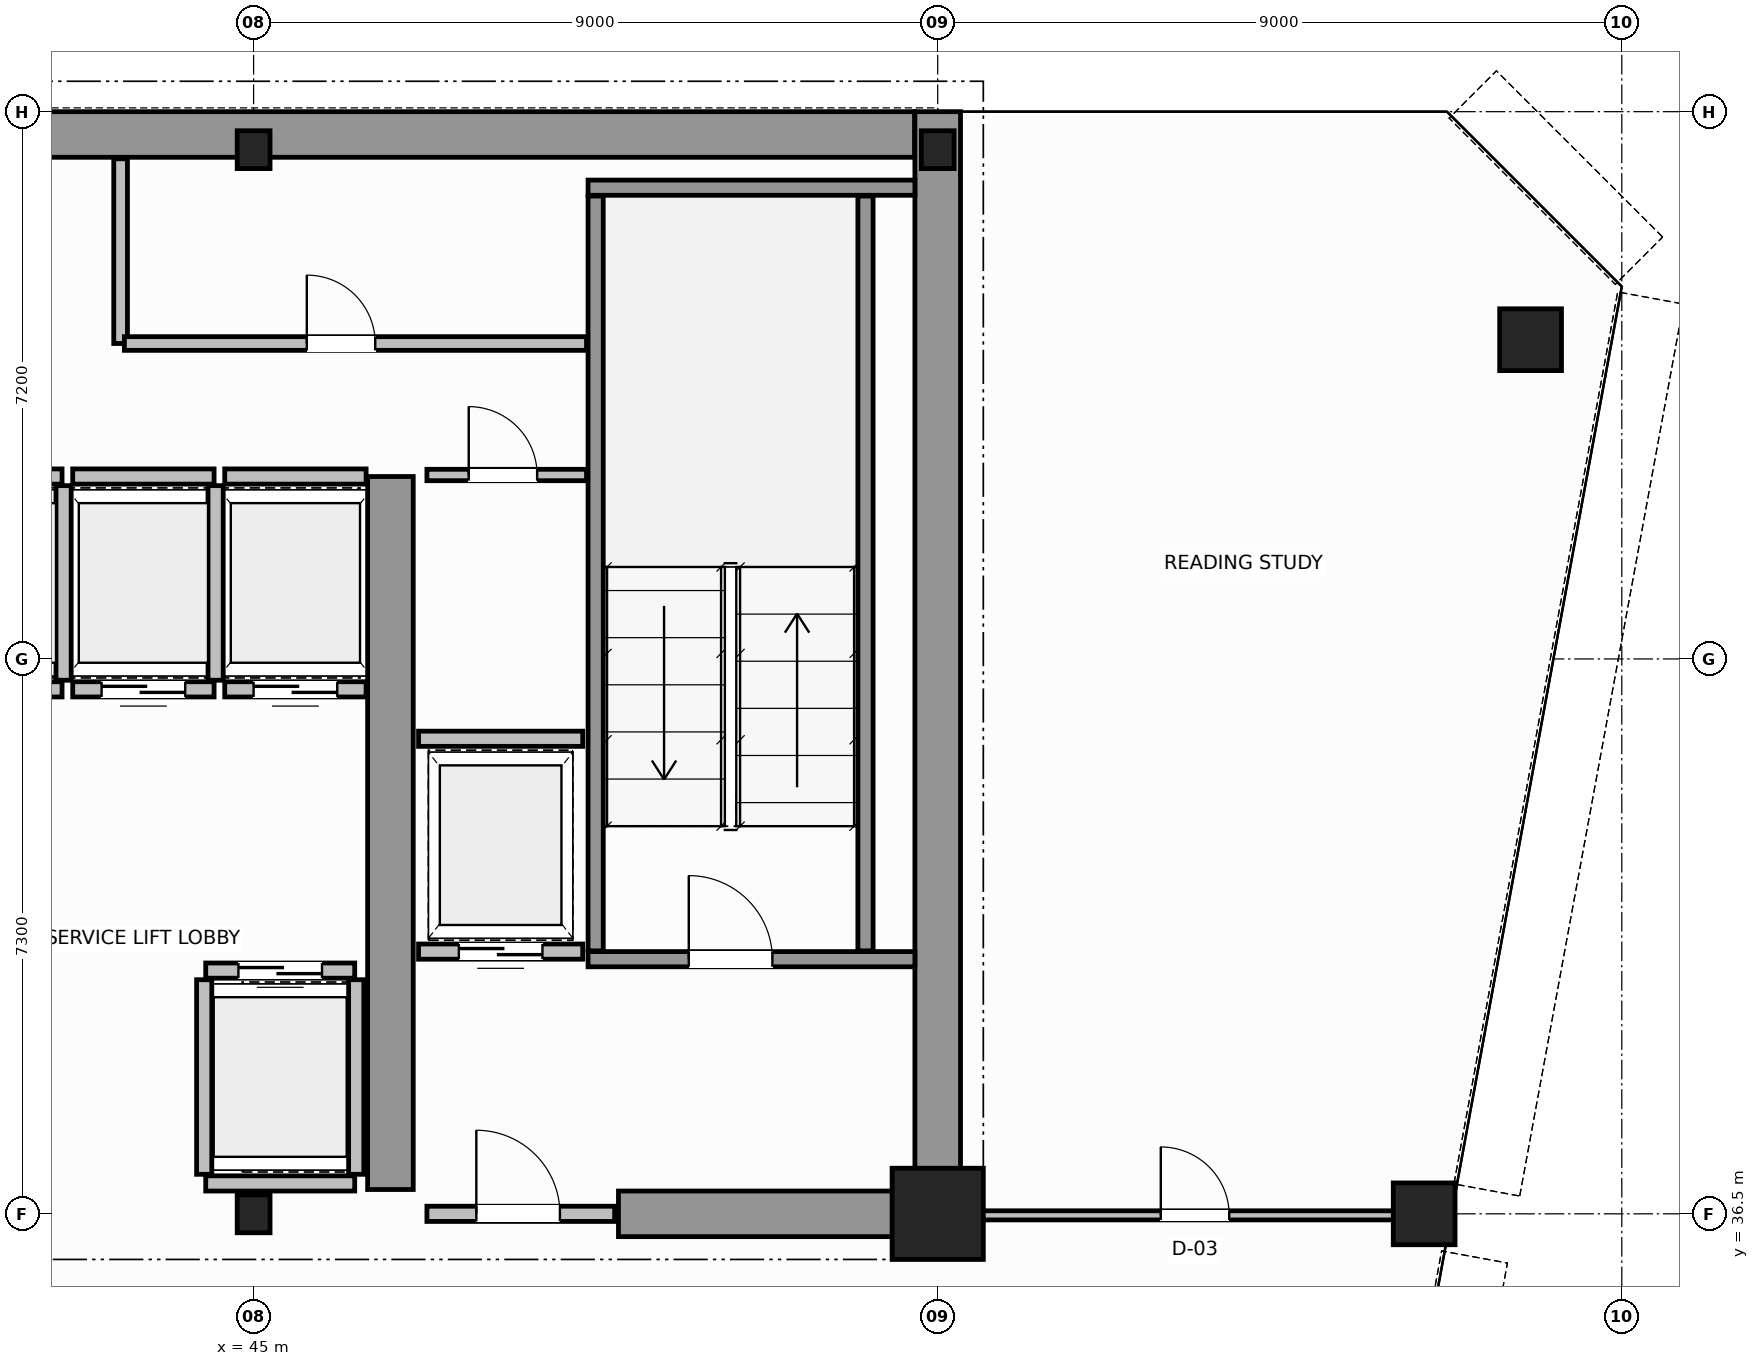
"""IFC4 building model, lengths in metres.
Left out: names, types, materials, properties, quantities, classifications, styles, units other than length and angle.
Written with IfcOpenShell. Run it as: python <this file> out.ifc"""

import sys

from ifc_helpers import new_model, si_unit, direction, frame, frame_2d, origin, origin_2d, place, context, subcontext, project, spatial, rectangle, hollow_circle, i_section, extrude, source, transform, mapped, element, fill, save


model = new_model("IFC4")
c1 = context("Model", 3, precision=1e-05, world=origin(), true_north=direction((0.0, 1.0)))
c2 = subcontext(c1, "Body", "Model", "MODEL_VIEW")
j1 = project(units=[si_unit("LENGTHUNIT", "METRE"), si_unit("PLANEANGLEUNIT", "RADIAN")], contexts=[c1])
p1 = place(None, origin())
s1 = spatial("IfcSite", under=j1, at=p1, CompositionType="ELEMENT")
p2 = place(p1, origin())
s2 = spatial("IfcBuilding", under=s1, at=p2, CompositionType="ELEMENT")
p3 = place(p2, frame((0.0, 0.0, 199.4)))
s3 = spatial("IfcBuildingStorey", under=s2, at=p3, CompositionType="ELEMENT", Elevation=199.4)
m1 = source(origin(), c2, "Body", "SweptSolid", [
    extrude(i_section(OverallWidth=0.432, OverallDepth=0.498, WebThickness=0.055, FlangeThickness=0.068, FilletRadius=0.015, at=origin_2d()), origin(), (0.0, 0.0, 1.0), 3.8),
])
p4 = place(p3, frame((45.0, 36.5, 0.0), z_axis=(0.0, 0.0, 1.0), x_axis=(1.0, 0.0, 0.0)))
e1 = element("IfcColumn", 1, at=p4, inside=s3, PredefinedType="COLUMN", context=c2, shape_type="MappedRepresentation", body=[
    mapped(m1, transform((0.0, 0.0, 0.0), scale=1.0)),
])
m2 = source(origin(), c2, "Body", "SweptSolid", [
    extrude(rectangle(XDim=1.2, YDim=1.2, at=origin_2d()), origin(), (0.0, 0.0, 1.0), 3.8),
])
p5 = place(p3, frame((54.0, 36.5, 0.0), z_axis=(0.0, 0.0, 1.0), x_axis=(1.0, 0.0, 0.0)))
e2 = element("IfcColumn", 2, at=p5, inside=s3, PredefinedType="COLUMN", context=c2, shape_type="MappedRepresentation", body=[
    mapped(m2, transform((0.0, 0.0, 0.0), scale=1.0)),
])
for number, where, z_axis, x_axis in (
    (3, (45.0, 50.5, 0.0), (0.0, 0.0, 1.0), (1.0, 0.0, 0.0)),
    (4, (54.0, 50.5, 0.0), (0.0, 0.0, 1.0), (1.0, 0.0, 0.0)),
):
    element("IfcColumn", number, at=place(p3, frame(where, z_axis=z_axis, x_axis=x_axis)), inside=s3, PredefinedType="COLUMN", context=c2, shape_type="MappedRepresentation", body=[
        mapped(m1, transform((0.0, 0.0, 0.0), scale=1.0)),
    ])
m3 = source(origin(), c2, "Body", "SweptSolid", [
    extrude(hollow_circle(Radius=0.406, WallThickness=0.04, at=origin_2d()), origin(), (0.0, 0.0, 1.0), 3.8),
])
for number, where, z_axis, x_axis in (
    (5, (61.8, 48.0, 0.0), (0.0, 0.0, 1.0), (1.0, 0.0, 0.0)),
    (6, (60.4, 36.5, 0.0), (0.0, 0.0, 1.0), (1.0, 0.0, 0.0)),
):
    element("IfcColumn", number, at=place(p3, frame(where, z_axis=z_axis, x_axis=x_axis)), inside=s3, PredefinedType="COLUMN", context=c2, shape_type="MappedRepresentation", body=[
        mapped(m3, transform((0.0, 0.0, 0.0), scale=1.0)),
    ])
p6 = place(p3, frame((34.002, 50.7, 0.0), z_axis=(0.0, 0.0, 1.0), x_axis=(1.0, 0.0, 0.0)))
e7 = element("IfcWall", 7, at=p6, inside=s3, PredefinedType="SHEAR", context=c2, shape_type="SweptSolid", body=[
    extrude(rectangle(XDim=19.694, YDim=0.6, at=frame_2d((9.847, 0.0))), origin(), (0.0, 0.0, 1.0), 3.8),
])
p7 = place(p3, frame((54.0, 36.5, 0.0), z_axis=(0.0, 0.0, 1.0), x_axis=(0.0, 1.0, 0.0)))
e8 = element("IfcWall", 8, at=p7, inside=s3, PredefinedType="SHEAR", context=c2, shape_type="SweptSolid", body=[
    extrude(rectangle(XDim=14.5, YDim=0.6, at=frame_2d((7.25, 0.0))), origin(), (0.0, 0.0, 1.0), 3.8),
])
p8 = place(p3, frame((49.8, 36.5, 0.0), z_axis=(0.0, 0.0, 1.0), x_axis=(1.0, 0.0, 0.0)))
e9 = element("IfcWall", 9, at=p8, inside=s3, PredefinedType="SHEAR", context=c2, shape_type="SweptSolid", body=[
    extrude(rectangle(XDim=3.88, YDim=0.6, at=frame_2d((1.94, 0.0))), origin(), (0.0, 0.0, 1.0), 2.58),
])
p9 = place(p3, frame((46.8, 36.82, 0.0), z_axis=(0.0, 0.0, 1.0), x_axis=(0.0, 1.0, 0.0)))
e10 = element("IfcWall", 10, at=p9, inside=s3, PredefinedType="SHEAR", context=c2, shape_type="SweptSolid", body=[
    extrude(rectangle(XDim=9.38, YDim=0.6, at=frame_2d((4.69, 0.0))), origin(), (0.0, 0.0, 1.0), 3.8),
])
p10 = place(p3, frame((49.4, 39.85, 0.0), z_axis=(0.0, 0.0, 1.0), x_axis=(1.0, 0.0, 0.0)))
e11 = element("IfcWall", 11, at=p10, inside=s3, PredefinedType="SOLIDWALL", context=c2, shape_type="SweptSolid", body=[
    extrude(rectangle(XDim=4.3, YDim=0.2, at=frame_2d((2.15, 0.0))), origin(), (0.0, 0.0, 1.0), 3.8),
])
p11 = place(p10, frame((1.325, 0.0, 0.0)))
e12 = element("IfcOpeningElement", 12, at=p11, cuts=e11, PredefinedType="OPENING", context=c2, shape_type="SweptSolid", body=[
    extrude(rectangle(XDim=1.1, YDim=2.15, at=frame_2d((0.55, 1.075))), frame((0.0, 0.11, 0.0), z_axis=(0.0, -1.0, 0.0), x_axis=(1.0, 0.0, 0.0)), (0.0, 0.0, 1.0), 0.22),
])
p12 = place(p3, frame((49.4, 50.0, 0.0), z_axis=(0.0, 0.0, 1.0), x_axis=(1.0, 0.0, 0.0)))
e13 = element("IfcWall", 13, at=p12, inside=s3, PredefinedType="SOLIDWALL", context=c2, shape_type="SweptSolid", body=[
    extrude(rectangle(XDim=4.3, YDim=0.2, at=frame_2d((2.15, 0.0))), origin(), (0.0, 0.0, 1.0), 3.8),
])
for number, where, z_axis, x_axis in (
    (14, (49.5, 39.96, 0.0), (0.0, 0.0, 1.0), (0.0, 1.0, 0.0)),
    (15, (53.05, 39.96, 0.0), (0.0, 0.0, 1.0), (0.0, 1.0, 0.0)),
):
    element("IfcWall", number, at=place(p3, frame(where, z_axis=z_axis, x_axis=x_axis)), inside=s3, PredefinedType="SOLIDWALL", context=c2, shape_type="SweptSolid", body=[
        extrude(rectangle(XDim=9.93, YDim=0.2, at=frame_2d((4.965, 0.0))), origin(), (0.0, 0.0, 1.0), 3.8),
    ])
p13 = place(p3, frame((47.28, 36.5, 0.0), z_axis=(0.0, 0.0, 1.0), x_axis=(1.0, 0.0, 0.0)))
e16 = element("IfcWall", 16, at=p13, inside=s3, PredefinedType="SOLIDWALL", context=c2, shape_type="SweptSolid", body=[
    extrude(rectangle(XDim=2.47, YDim=0.2, at=frame_2d((1.235, 0.0))), origin(), (0.0, 0.0, 1.0), 2.57),
])
p14 = place(p13, frame((0.65, 0.0, 0.0)))
e17 = element("IfcOpeningElement", 17, at=p14, cuts=e16, PredefinedType="OPENING", context=c2, shape_type="SweptSolid", body=[
    extrude(rectangle(XDim=1.1, YDim=2.15, at=frame_2d((0.55, 1.075))), frame((0.0, 0.11, 0.0), z_axis=(0.0, -1.0, 0.0), x_axis=(1.0, 0.0, 0.0)), (0.0, 0.0, 1.0), 0.22),
])
p15 = place(p3, frame((44.37, 39.7, 0.0), z_axis=(0.0, 0.0, 1.0), x_axis=(1.0, 0.0, 0.0)))
e18 = element("IfcWall", 18, at=p15, inside=s3, PredefinedType="SOLIDWALL", context=c2, shape_type="SweptSolid", body=[
    extrude(rectangle(XDim=1.96, YDim=0.2, at=frame_2d((0.98, 0.0))), origin(), (0.0, 0.0, 1.0), 3.58),
])
p16 = place(p15, frame((0.43, 0.0, 0.0)))
e19 = element("IfcOpeningElement", 19, at=p16, cuts=e18, PredefinedType="OPENING", context=c2, shape_type="SweptSolid", body=[
    extrude(rectangle(XDim=1.1, YDim=2.15, at=frame_2d((0.55, 1.075))), frame((0.0, 0.11, 0.0), z_axis=(0.0, -1.0, 0.0), x_axis=(1.0, 0.0, 0.0)), (0.0, 0.0, 1.0), 0.22),
])
p17 = place(p3, frame((44.37, 36.9, 0.0), z_axis=(0.0, 0.0, 1.0), x_axis=(1.0, 0.0, 0.0)))
e20 = element("IfcWall", 20, at=p17, inside=s3, PredefinedType="SOLIDWALL", context=c2, shape_type="SweptSolid", body=[
    extrude(rectangle(XDim=1.96, YDim=0.2, at=frame_2d((0.98, 0.0))), origin(), (0.0, 0.0, 1.0), 2.57),
])
for number, where, z_axis, x_axis in (
    (21, (44.35, 37.02, 0.0), (0.0, 0.0, 1.0), (0.0, 1.0, 0.0)),
    (22, (46.35, 37.02, 0.0), (0.0, 0.0, 1.0), (0.0, 1.0, 0.0)),
):
    element("IfcWall", number, at=place(p3, frame(where, z_axis=z_axis, x_axis=x_axis)), inside=s3, PredefinedType="SOLIDWALL", context=c2, shape_type="SweptSolid", body=[
        extrude(rectangle(XDim=2.56, YDim=0.2, at=frame_2d((1.28, 0.0))), origin(), (0.0, 0.0, 1.0), 3.58),
    ])
p18 = place(p3, frame((40.62, 43.4, 0.0), z_axis=(0.0, 0.0, 1.0), x_axis=(1.0, 0.0, 0.0)))
e23 = element("IfcWall", 23, at=p18, inside=s3, PredefinedType="SOLIDWALL", context=c2, shape_type="SweptSolid", body=[
    extrude(rectangle(XDim=1.86, YDim=0.2, at=frame_2d((0.93, 0.0))), origin(), (0.0, 0.0, 1.0), 3.58),
])
p19 = place(p18, frame((0.38, 0.0, 0.0)))
e24 = element("IfcOpeningElement", 24, at=p19, cuts=e23, PredefinedType="OPENING", context=c2, shape_type="SweptSolid", body=[
    extrude(rectangle(XDim=1.1, YDim=2.15, at=frame_2d((0.55, 1.075))), frame((0.0, 0.11, 0.0), z_axis=(0.0, -1.0, 0.0), x_axis=(1.0, 0.0, 0.0)), (0.0, 0.0, 1.0), 0.22),
])
p20 = place(p3, frame((40.62, 46.2, 0.0), z_axis=(0.0, 0.0, 1.0), x_axis=(1.0, 0.0, 0.0)))
e25 = element("IfcWall", 25, at=p20, inside=s3, PredefinedType="SOLIDWALL", context=c2, shape_type="SweptSolid", body=[
    extrude(rectangle(XDim=1.86, YDim=0.2, at=frame_2d((0.93, 0.0))), origin(), (0.0, 0.0, 1.0), 3.58),
])
p21 = place(p3, frame((42.5, 43.52, 0.0), z_axis=(0.0, 0.0, 1.0), x_axis=(0.0, 1.0, 0.0)))
e26 = element("IfcWall", 26, at=p21, inside=s3, PredefinedType="SOLIDWALL", context=c2, shape_type="SweptSolid", body=[
    extrude(rectangle(XDim=2.56, YDim=0.2, at=frame_2d((1.28, 0.0))), origin(), (0.0, 0.0, 1.0), 3.58),
])
p22 = place(p3, frame((42.62, 43.4, 0.0), z_axis=(0.0, 0.0, 1.0), x_axis=(1.0, 0.0, 0.0)))
e27 = element("IfcWall", 27, at=p22, inside=s3, PredefinedType="SOLIDWALL", context=c2, shape_type="SweptSolid", body=[
    extrude(rectangle(XDim=1.86, YDim=0.2, at=frame_2d((0.93, 0.0))), origin(), (0.0, 0.0, 1.0), 3.58),
])
p23 = place(p22, frame((0.38, 0.0, 0.0)))
e28 = element("IfcOpeningElement", 28, at=p23, cuts=e27, PredefinedType="OPENING", context=c2, shape_type="SweptSolid", body=[
    extrude(rectangle(XDim=1.1, YDim=2.15, at=frame_2d((0.55, 1.075))), frame((0.0, 0.11, 0.0), z_axis=(0.0, -1.0, 0.0), x_axis=(1.0, 0.0, 0.0)), (0.0, 0.0, 1.0), 0.22),
])
p24 = place(p3, frame((42.62, 46.2, 0.0), z_axis=(0.0, 0.0, 1.0), x_axis=(1.0, 0.0, 0.0)))
e29 = element("IfcWall", 29, at=p24, inside=s3, PredefinedType="SOLIDWALL", context=c2, shape_type="SweptSolid", body=[
    extrude(rectangle(XDim=1.86, YDim=0.2, at=frame_2d((0.93, 0.0))), origin(), (0.0, 0.0, 1.0), 3.58),
])
p25 = place(p3, frame((44.5, 43.52, 0.0), z_axis=(0.0, 0.0, 1.0), x_axis=(0.0, 1.0, 0.0)))
e30 = element("IfcWall", 30, at=p25, inside=s3, PredefinedType="SOLIDWALL", context=c2, shape_type="SweptSolid", body=[
    extrude(rectangle(XDim=2.56, YDim=0.2, at=frame_2d((1.28, 0.0))), origin(), (0.0, 0.0, 1.0), 3.58),
])
p26 = place(p3, frame((44.62, 43.4, 0.0), z_axis=(0.0, 0.0, 1.0), x_axis=(1.0, 0.0, 0.0)))
e31 = element("IfcWall", 31, at=p26, inside=s3, PredefinedType="SOLIDWALL", context=c2, shape_type="SweptSolid", body=[
    extrude(rectangle(XDim=1.86, YDim=0.2, at=frame_2d((0.93, 0.0))), origin(), (0.0, 0.0, 1.0), 3.58),
])
p27 = place(p26, frame((0.38, 0.0, 0.0)))
e32 = element("IfcOpeningElement", 32, at=p27, cuts=e31, PredefinedType="OPENING", context=c2, shape_type="SweptSolid", body=[
    extrude(rectangle(XDim=1.1, YDim=2.15, at=frame_2d((0.55, 1.075))), frame((0.0, 0.11, 0.0), z_axis=(0.0, -1.0, 0.0), x_axis=(1.0, 0.0, 0.0)), (0.0, 0.0, 1.0), 0.22),
])
p28 = place(p3, frame((44.62, 46.2, 0.0), z_axis=(0.0, 0.0, 1.0), x_axis=(1.0, 0.0, 0.0)))
e33 = element("IfcWall", 33, at=p28, inside=s3, PredefinedType="SOLIDWALL", context=c2, shape_type="SweptSolid", body=[
    extrude(rectangle(XDim=1.86, YDim=0.2, at=frame_2d((0.93, 0.0))), origin(), (0.0, 0.0, 1.0), 3.58),
])
p29 = place(p3, frame((47.17, 39.95, 0.0), z_axis=(0.0, 0.0, 1.0), x_axis=(1.0, 0.0, 0.0)))
e34 = element("IfcWall", 34, at=p29, inside=s3, PredefinedType="SOLIDWALL", context=c2, shape_type="SweptSolid", body=[
    extrude(rectangle(XDim=2.16, YDim=0.2, at=frame_2d((1.08, 0.0))), origin(), (0.0, 0.0, 1.0), 3.58),
])
p30 = place(p29, frame((0.53, 0.0, 0.0)))
e35 = element("IfcOpeningElement", 35, at=p30, cuts=e34, PredefinedType="OPENING", context=c2, shape_type="SweptSolid", body=[
    extrude(rectangle(XDim=1.1, YDim=2.15, at=frame_2d((0.55, 1.075))), frame((0.0, 0.11, 0.0), z_axis=(0.0, -1.0, 0.0), x_axis=(1.0, 0.0, 0.0)), (0.0, 0.0, 1.0), 0.22),
])
p31 = place(p3, frame((47.17, 42.75, 0.0), z_axis=(0.0, 0.0, 1.0), x_axis=(1.0, 0.0, 0.0)))
e36 = element("IfcWall", 36, at=p31, inside=s3, PredefinedType="SOLIDWALL", context=c2, shape_type="SweptSolid", body=[
    extrude(rectangle(XDim=2.16, YDim=0.2, at=frame_2d((1.08, 0.0))), origin(), (0.0, 0.0, 1.0), 3.58),
])
p32 = place(p3, frame((47.28, 46.22, 0.0), z_axis=(0.0, 0.0, 1.0), x_axis=(1.0, 0.0, 0.0)))
e37 = element("IfcWall", 37, at=p32, inside=s3, PredefinedType="PARTITIONING", context=c2, shape_type="SweptSolid", body=[
    extrude(rectangle(XDim=2.1, YDim=0.15, at=frame_2d((1.05, 0.0))), origin(), (0.0, 0.0, 1.0), 3.58),
])
p33 = place(p32, frame((0.55, 0.0, 0.0)))
e38 = element("IfcOpeningElement", 38, at=p33, cuts=e37, PredefinedType="OPENING", context=c2, shape_type="SweptSolid", body=[
    extrude(rectangle(XDim=0.9, YDim=2.1, at=frame_2d((0.45, 1.05))), frame((0.0, 0.085, 0.0), z_axis=(0.0, -1.0, 0.0), x_axis=(1.0, 0.0, 0.0)), (0.0, 0.0, 1.0), 0.17),
])
p34 = place(p3, frame((43.25, 47.95, 0.0), z_axis=(0.0, 0.0, 1.0), x_axis=(0.0, 1.0, 0.0)))
e39 = element("IfcWall", 39, at=p34, inside=s3, PredefinedType="PLUMBINGWALL", context=c2, shape_type="SweptSolid", body=[
    extrude(rectangle(XDim=2.43, YDim=0.18, at=frame_2d((1.215, 0.0))), origin(), (0.0, 0.0, 1.0), 3.58),
])
p35 = place(p3, frame((43.3, 47.95, 0.0), z_axis=(0.0, 0.0, 1.0), x_axis=(1.0, 0.0, 0.0)))
e40 = element("IfcWall", 40, at=p35, inside=s3, PredefinedType="PLUMBINGWALL", context=c2, shape_type="SweptSolid", body=[
    extrude(rectangle(XDim=6.08, YDim=0.18, at=frame_2d((3.04, 0.0))), origin(), (0.0, 0.0, 1.0), 3.58),
])
p36 = place(p35, frame((2.4, 0.0, 0.0)))
e41 = element("IfcOpeningElement", 41, at=p36, cuts=e40, PredefinedType="OPENING", context=c2, shape_type="SweptSolid", body=[
    extrude(rectangle(XDim=0.9, YDim=2.15, at=frame_2d((0.45, 1.075))), frame((0.0, 0.1, 0.0), z_axis=(0.0, -1.0, 0.0), x_axis=(1.0, 0.0, 0.0)), (0.0, 0.0, 1.0), 0.2),
])
p37 = place(p3, frame((54.06, 36.48, 0.0), z_axis=(0.0, 0.0, 1.0), x_axis=(1.0, 0.0, 0.0)))
e42 = element("IfcWall", 42, at=p37, inside=s3, PredefinedType="PARTITIONING", context=c2, shape_type="SweptSolid", body=[
    extrude(rectangle(XDim=6.651, YDim=0.12, at=frame_2d((3.325, 0.0))), origin(), (0.0, 0.0, 1.0), 2.97),
])
p38 = place(p37, frame((2.875, 0.0, 0.0)))
e43 = element("IfcOpeningElement", 43, at=p38, cuts=e42, PredefinedType="OPENING", context=c2, shape_type="SweptSolid", body=[
    extrude(rectangle(XDim=0.9, YDim=2.15, at=frame_2d((0.45, 1.075))), frame((0.0, 0.07, 0.0), z_axis=(0.0, -1.0, 0.0), x_axis=(1.0, 0.0, 0.0)), (0.0, 0.0, 1.0), 0.14),
])
m4 = source(origin(), c2, "Body", "SweptSolid", [
    extrude(rectangle(XDim=1.1, YDim=2.15, at=frame_2d((0.55, 1.075))), frame((0.0, 0.025, 0.0), z_axis=(0.0, -1.0, 0.0), x_axis=(1.0, 0.0, 0.0)), (0.0, 0.0, 1.0), 0.05),
])
p39 = place(p11, origin())
e44 = element("IfcDoor", 44, at=p39, inside=s3, OperationType="SINGLE_SWING_RIGHT", PredefinedType="DOOR", context=c2, shape_type="MappedRepresentation", body=[
    mapped(m4, transform((0.0, 0.0, 0.0), scale=1.0)),
])
fill(e12, e44)
p40 = place(p14, origin())
e45 = element("IfcDoor", 45, at=p40, inside=s3, OperationType="SINGLE_SWING_LEFT", PredefinedType="DOOR", context=c2, shape_type="MappedRepresentation", body=[
    mapped(m4, transform((0.0, 0.0, 0.0), scale=1.0)),
])
fill(e17, e45)
p41 = place(p16, origin())
e46 = element("IfcDoor", 46, at=p41, inside=s3, OperationType="DOUBLE_DOOR_SLIDING", PredefinedType="DOOR", context=c2, shape_type="MappedRepresentation", body=[
    mapped(m4, transform((0.0, 0.0, 0.0), scale=1.0)),
])
fill(e19, e46)
p42 = place(p23, origin())
e47 = element("IfcDoor", 47, at=p42, inside=s3, OperationType="DOUBLE_DOOR_SLIDING", PredefinedType="DOOR", context=c2, shape_type="MappedRepresentation", body=[
    mapped(m4, transform((0.0, 0.0, 0.0), scale=1.0)),
])
fill(e28, e47)
p43 = place(p27, origin())
e48 = element("IfcDoor", 48, at=p43, inside=s3, OperationType="DOUBLE_DOOR_SLIDING", PredefinedType="DOOR", context=c2, shape_type="MappedRepresentation", body=[
    mapped(m4, transform((0.0, 0.0, 0.0), scale=1.0)),
])
fill(e32, e48)
p44 = place(p30, origin())
e49 = element("IfcDoor", 49, at=p44, inside=s3, OperationType="DOUBLE_DOOR_SLIDING", PredefinedType="DOOR", context=c2, shape_type="MappedRepresentation", body=[
    mapped(m4, transform((0.0, 0.0, 0.0), scale=1.0)),
])
fill(e35, e49)
m5 = source(origin(), c2, "Body", "SweptSolid", [
    extrude(rectangle(XDim=0.9, YDim=2.1, at=frame_2d((0.45, 1.05))), frame((0.0, 0.025, 0.0), z_axis=(0.0, -1.0, 0.0), x_axis=(1.0, 0.0, 0.0)), (0.0, 0.0, 1.0), 0.05),
])
p45 = place(p33, origin())
e50 = element("IfcDoor", 50, at=p45, inside=s3, OperationType="SINGLE_SWING_RIGHT", PredefinedType="DOOR", context=c2, shape_type="MappedRepresentation", body=[
    mapped(m5, transform((0.0, 0.0, 0.0), scale=1.0)),
])
fill(e38, e50)
m6 = source(origin(), c2, "Body", "SweptSolid", [
    extrude(rectangle(XDim=0.9, YDim=2.15, at=frame_2d((0.45, 1.075))), frame((0.0, 0.025, 0.0), z_axis=(0.0, -1.0, 0.0), x_axis=(1.0, 0.0, 0.0)), (0.0, 0.0, 1.0), 0.05),
])
p46 = place(p36, origin())
e51 = element("IfcDoor", 51, at=p46, inside=s3, OperationType="SINGLE_SWING_RIGHT", PredefinedType="DOOR", context=c2, shape_type="MappedRepresentation", body=[
    mapped(m6, transform((0.0, 0.0, 0.0), scale=1.0)),
])
fill(e41, e51)
p47 = place(p38, origin())
e52 = element("IfcDoor", 52, at=p47, inside=s3, OperationType="SINGLE_SWING_RIGHT", PredefinedType="DOOR", context=c2, shape_type="MappedRepresentation", body=[
    mapped(m6, transform((0.0, 0.0, 0.0), scale=1.0)),
])
fill(e43, e52)
save(model, sys.argv[1])
